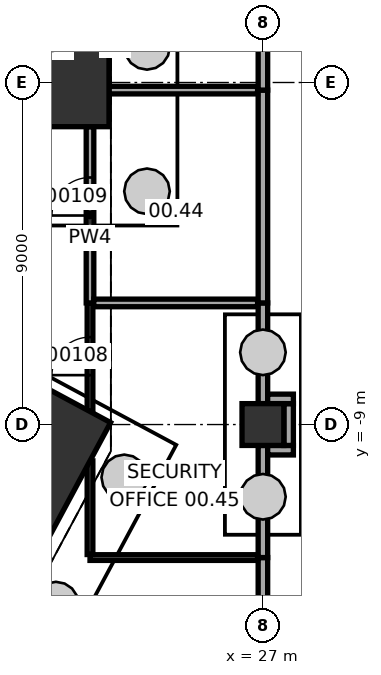
"""IFC4 building model, lengths in metres.
Left out: names, types, materials, properties, quantities, classifications, styles, units other than length and angle.
Written with IfcOpenShell. Run it as: python <this file> out.ifc"""

import sys

from ifc_helpers import new_model, si_unit, direction, frame, frame_2d, origin, origin_2d, place, context, subcontext, project, spatial, rectangle, extrude, element, fill, save


model = new_model("IFC4")
c1 = context("Model", 3, precision=1e-05, world=origin(), true_north=direction((0.0, 1.0)))
c2 = subcontext(c1, "Body", "Model", "MODEL_VIEW")
j1 = project(units=[si_unit("LENGTHUNIT", "METRE"), si_unit("PLANEANGLEUNIT", "RADIAN")], contexts=[c1])
p1 = place(None, origin())
s1 = spatial("IfcSite", under=j1, at=p1, CompositionType="ELEMENT")
p2 = place(p1, origin())
s2 = spatial("IfcBuilding", under=s1, at=p2, CompositionType="ELEMENT")
p3 = place(p2, origin())
s3 = spatial("IfcBuildingStorey", under=s2, at=p3, CompositionType="ELEMENT", Elevation=0.0)
p4 = place(p3, frame((22.05, 0.937, -0.3), z_axis=(0.0, 0.0, 1.0), x_axis=(0.0, 1.0, 0.0)))
e1 = element("IfcColumn", 1, at=p4, inside=s3, PredefinedType="COLUMN", context=c2, shape_type="SweptSolid", body=[
    extrude(rectangle(XDim=4.2, YDim=1.8, at=origin_2d()), origin(), (0.0, 0.0, 1.0), 7.8),
])
p5 = place(p3, frame((20.779, -11.165, -0.3), z_axis=(0.0, 0.0, 1.0), x_axis=(0.473322742071, 0.880889086003, 0.0)))
e2 = element("IfcColumn", 2, at=p5, inside=s3, PredefinedType="COLUMN", context=c2, shape_type="SweptSolid", body=[
    extrude(rectangle(XDim=6.0, YDim=1.8, at=origin_2d()), origin(), (0.0, 0.0, 1.0), 7.8),
])
p6 = place(p3, frame((27.0, -9.0, -0.3), z_axis=(0.0, 0.0, 1.0), x_axis=(1.0, 0.0, 0.0)))
e3 = element("IfcColumn", 3, at=p6, inside=s3, PredefinedType="COLUMN", context=c2, shape_type="SweptSolid", body=[
    extrude(rectangle(XDim=1.1, YDim=1.1, at=origin_2d()), origin(), (0.0, 0.0, 1.0), 7.8),
])
p7 = place(p3, frame((27.0, -19.2, 0.0), z_axis=(0.0, 0.0, 1.0), x_axis=(0.0, 1.0, 0.0)))
e4 = element("IfcWall", 4, at=p7, inside=s3, PredefinedType="SOLIDWALL", context=c2, shape_type="SweptSolid", body=[
    extrude(rectangle(XDim=6.7, YDim=0.25, at=frame_2d((3.35, 0.0))), origin(), (0.0, 0.0, 1.0), 6.0),
])
p8 = place(p7, frame((3.0, 0.0, 0.0)))
e5 = element("IfcOpeningElement", 5, at=p8, cuts=e4, PredefinedType="OPENING", context=c2, shape_type="SweptSolid", body=[
    extrude(rectangle(XDim=2.4, YDim=2.4, at=frame_2d((1.2, 1.2))), frame((0.0, 0.135, 0.0), z_axis=(0.0, -1.0, 0.0), x_axis=(1.0, 0.0, 0.0)), (0.0, 0.0, 1.0), 0.27),
])
p9 = place(p3, frame((26.86, -12.5, 0.0), z_axis=(0.0, 0.0, 1.0), x_axis=(-1.0, 0.0, 0.0)))
e6 = element("IfcWall", 6, at=p9, inside=s3, PredefinedType="PARTITIONING", context=c2, shape_type="SweptSolid", body=[
    extrude(rectangle(XDim=4.41, YDim=0.15, at=frame_2d((2.205, 0.0))), origin(), (0.0, 0.0, 1.0), 7.2),
])
p10 = place(p3, frame((27.0, -12.5, 0.0), z_axis=(0.0, 0.0, 1.0), x_axis=(0.0, 1.0, 0.0)))
e7 = element("IfcWall", 7, at=p10, inside=s3, PredefinedType="SOLIDWALL", context=c2, shape_type="SweptSolid", body=[
    extrude(rectangle(XDim=2.95, YDim=0.25, at=frame_2d((1.475, 0.0))), origin(), (0.0, 0.0, 1.0), 6.0),
])
p11 = place(p3, frame((22.45, -12.42, 0.0), z_axis=(0.0, 0.0, 1.0), x_axis=(0.0, 1.0, 0.0)))
e8 = element("IfcWall", 8, at=p11, inside=s3, PredefinedType="PARTITIONING", context=c2, shape_type="SweptSolid", body=[
    extrude(rectangle(XDim=2.464, YDim=0.15, at=frame_2d((1.232, 0.0))), origin(), (0.0, 0.0, 1.0), 7.2),
])
p12 = place(p3, frame((27.125, -9.675, 0.0), z_axis=(0.0, 0.0, 1.0), x_axis=(1.0, 0.0, 0.0)))
e9 = element("IfcWall", 9, at=p12, inside=s3, PredefinedType="SOLIDWALL", context=c2, shape_type="SweptSolid", body=[
    extrude(rectangle(XDim=0.677, YDim=0.25, at=frame_2d((0.338, 0.0))), origin(), (0.0, 0.0, 1.0), 7.2),
])
p13 = place(p3, frame((27.677, -9.55, 0.0), z_axis=(0.0, 0.0, 1.0), x_axis=(0.0, 1.0, 0.0)))
e10 = element("IfcWall", 10, at=p13, inside=s3, PredefinedType="SOLIDWALL", context=c2, shape_type="SweptSolid", body=[
    extrude(rectangle(XDim=1.1, YDim=0.25, at=frame_2d((0.55, 0.0))), origin(), (0.0, 0.0, 1.0), 7.2),
])
p14 = place(p3, frame((22.45, -8.657, 0.0), z_axis=(0.0, 0.0, 1.0), x_axis=(0.0, 1.0, 0.0)))
e11 = element("IfcWall", 11, at=p14, inside=s3, PredefinedType="PARTITIONING", context=c2, shape_type="SweptSolid", body=[
    extrude(rectangle(XDim=2.857, YDim=0.15, at=frame_2d((1.428, 0.0))), origin(), (0.0, 0.0, 1.0), 5.7),
])
p15 = place(p14, frame((0.957, 0.0, 0.0)))
e12 = element("IfcOpeningElement", 12, at=p15, cuts=e11, PredefinedType="OPENING", context=c2, shape_type="SweptSolid", body=[
    extrude(rectangle(XDim=1.0, YDim=2.1, at=frame_2d((0.5, 1.05))), frame((0.0, 0.085, 0.0), z_axis=(0.0, -1.0, 0.0), x_axis=(1.0, 0.0, 0.0)), (0.0, 0.0, 1.0), 0.17),
])
p16 = place(p3, frame((27.0, -8.45, 0.0), z_axis=(0.0, 0.0, 1.0), x_axis=(0.0, 1.0, 0.0)))
e13 = element("IfcWall", 13, at=p16, inside=s3, PredefinedType="SOLIDWALL", context=c2, shape_type="SweptSolid", body=[
    extrude(rectangle(XDim=2.65, YDim=0.25, at=frame_2d((1.325, 0.0))), origin(), (0.0, 0.0, 1.0), 6.0),
])
p17 = place(p3, frame((27.125, -8.325, 0.0), z_axis=(0.0, 0.0, 1.0), x_axis=(1.0, 0.0, 0.0)))
e14 = element("IfcWall", 14, at=p17, inside=s3, PredefinedType="SOLIDWALL", context=c2, shape_type="SweptSolid", body=[
    extrude(rectangle(XDim=0.677, YDim=0.25, at=frame_2d((0.338, 0.0))), origin(), (0.0, 0.0, 1.0), 7.2),
])
p18 = place(p3, frame((22.45, -5.8, 0.0), z_axis=(0.0, 0.0, 1.0), x_axis=(0.0, 1.0, 0.0)))
e15 = element("IfcWall", 15, at=p18, inside=s3, PredefinedType="PARTITIONING", context=c2, shape_type="SweptSolid", body=[
    extrude(rectangle(XDim=4.637, YDim=0.2, at=frame_2d((2.319, 0.0))), origin(), (0.0, 0.0, 1.0), 5.7),
])
p19 = place(p18, frame((2.3, 0.0, 0.0)))
e16 = element("IfcOpeningElement", 16, at=p19, cuts=e15, PredefinedType="OPENING", context=c2, shape_type="SweptSolid", body=[
    extrude(rectangle(XDim=1.0, YDim=2.1, at=frame_2d((0.5, 1.05))), frame((0.0, 0.11, 0.0), z_axis=(0.0, -1.0, 0.0), x_axis=(1.0, 0.0, 0.0)), (0.0, 0.0, 1.0), 0.22),
])
p20 = place(p3, frame((26.86, -5.8, 0.0), z_axis=(0.0, 0.0, 1.0), x_axis=(-1.0, 0.0, 0.0)))
e17 = element("IfcWall", 17, at=p20, inside=s3, PredefinedType="PARTITIONING", context=c2, shape_type="SweptSolid", body=[
    extrude(rectangle(XDim=4.31, YDim=0.2, at=frame_2d((2.155, 0.0))), origin(), (0.0, 0.0, 1.0), 7.2),
])
p21 = place(p3, frame((27.0, -5.8, 0.0), z_axis=(0.0, 0.0, 1.0), x_axis=(0.0, 1.0, 0.0)))
e18 = element("IfcWall", 18, at=p21, inside=s3, PredefinedType="SOLIDWALL", context=c2, shape_type="SweptSolid", body=[
    extrude(rectangle(XDim=5.6, YDim=0.25, at=frame_2d((2.8, 0.0))), origin(), (0.0, 0.0, 1.0), 6.0),
])
p22 = place(p3, frame((22.95, -0.2, 0.0), z_axis=(0.0, 0.0, 1.0), x_axis=(1.0, 0.0, 0.0)))
e19 = element("IfcWall", 19, at=p22, inside=s3, PredefinedType="PARTITIONING", context=c2, shape_type="SweptSolid", body=[
    extrude(rectangle(XDim=3.91, YDim=0.2, at=frame_2d((1.955, 0.0))), origin(), (0.0, 0.0, 1.0), 7.2),
])
p23 = place(p3, frame((27.0, -0.2, 0.0), z_axis=(0.0, 0.0, 1.0), x_axis=(0.0, 1.0, 0.0)))
e20 = element("IfcWall", 20, at=p23, inside=s3, PredefinedType="SOLIDWALL", context=c2, shape_type="SweptSolid", body=[
    extrude(rectangle(XDim=8.65, YDim=0.25, at=frame_2d((4.325, 0.0))), origin(), (0.0, 0.0, 1.0), 6.0),
])
p24 = place(p15, origin())
e21 = element("IfcDoor", 21, at=p24, inside=s3, OperationType="SINGLE_SWING_LEFT", PredefinedType="DOOR", context=c2, shape_type="SweptSolid", body=[
    extrude(rectangle(XDim=1.0, YDim=2.1, at=frame_2d((0.5, 1.05))), frame((0.0, 0.025, 0.0), z_axis=(0.0, -1.0, 0.0), x_axis=(1.0, 0.0, 0.0)), (0.0, 0.0, 1.0), 0.05),
])
fill(e12, e21)
p25 = place(p19, origin())
e22 = element("IfcDoor", 22, at=p25, inside=s3, OperationType="SINGLE_SWING_LEFT", PredefinedType="DOOR", context=c2, shape_type="SweptSolid", body=[
    extrude(rectangle(XDim=1.0, YDim=2.1, at=frame_2d((0.5, 1.05))), frame((0.0, 0.025, 0.0), z_axis=(0.0, -1.0, 0.0), x_axis=(1.0, 0.0, 0.0)), (0.0, 0.0, 1.0), 0.05),
])
fill(e16, e22)
save(model, sys.argv[1])
